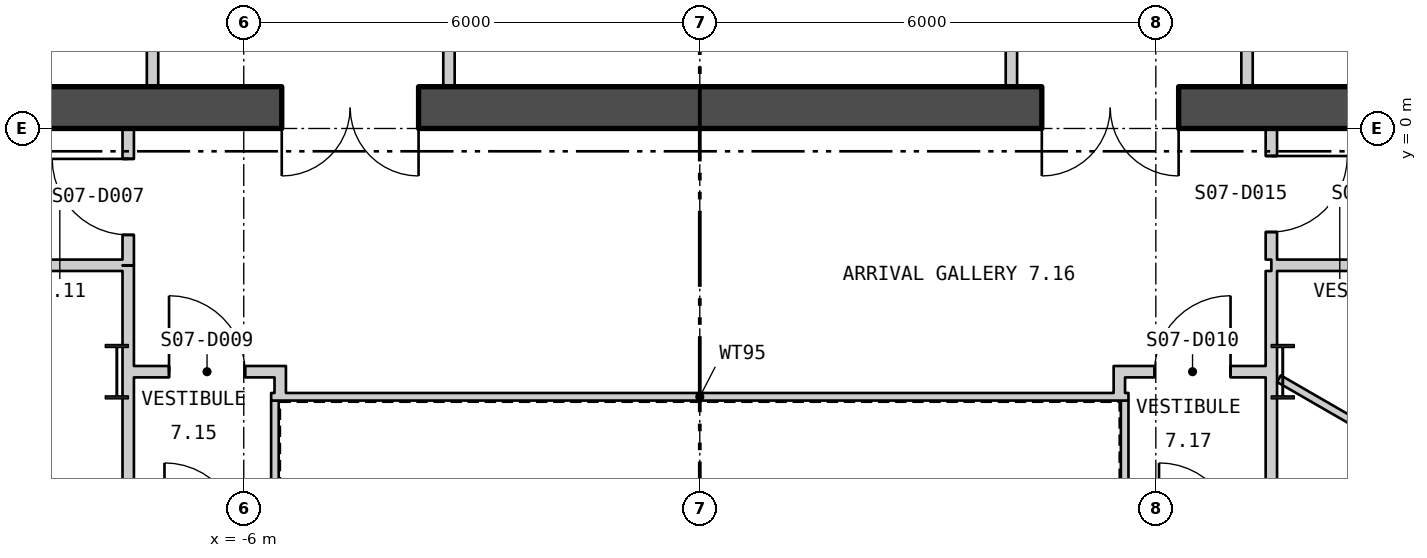
"""IFC4 building model, lengths in metres.
Left out: names, types, materials, properties, quantities, classifications, styles, units other than length and angle.
Written with IfcOpenShell. Run it as: python <this file> out.ifc"""

import sys

from ifc_helpers import new_model, si_unit, direction, frame, frame_2d, origin, origin_2d, place, context, subcontext, project, spatial, polyline, rectangle, i_section, outline, extrude, element, fill, save


model = new_model("IFC4")
c1 = context("Model", 3, precision=1e-05, world=origin(), true_north=direction((0.0, 1.0)))
c2 = subcontext(c1, "Body", "Model", "MODEL_VIEW")
j1 = project(units=[si_unit("LENGTHUNIT", "METRE"), si_unit("PLANEANGLEUNIT", "RADIAN")], contexts=[c1])
p1 = place(None, origin())
s1 = spatial("IfcSite", under=j1, at=p1, CompositionType="ELEMENT")
p2 = place(p1, origin())
s2 = spatial("IfcBuilding", under=s1, at=p2, CompositionType="ELEMENT")
p3 = place(p2, frame((0.0, 0.0, 97.8)))
s3 = spatial("IfcBuildingStorey", under=s2, at=p3, CompositionType="ELEMENT", Elevation=97.8)
for number, where, z_axis, x_axis in (
    (1, (7.67, -3.2, 0.0), (0.0, 0.0, 1.0), (1.0, 0.0, 0.0)),
    (2, (-7.67, -3.2, 0.0), (0.0, 0.0, 1.0), (1.0, 0.0, 0.0)),
):
    element("IfcColumn", number, at=place(p3, frame(where, z_axis=z_axis, x_axis=x_axis)), inside=s3, PredefinedType="COLUMN", context=c2, shape_type="SweptSolid", body=[
        extrude(i_section(OverallWidth=0.304, OverallDepth=0.716, WebThickness=0.021, FlangeThickness=0.04, at=origin_2d()), origin(), (0.0, 0.0, 1.0), 4.5),
    ])
p4 = place(p3, frame((-27.775, 11.479, -0.18), z_axis=(0.0, 0.0, 1.0), x_axis=(0.500000711659, -0.866024992908, 0.0)))
e3 = element("IfcWall", 3, at=p4, inside=s3, PredefinedType="SOLIDWALL", context=c2, shape_type="SweptSolid", body=[
    extrude(outline(polyline([(-0.13, -0.225), (45.87, -0.225), (45.61, 0.225), (0.13, 0.225), (-0.13, -0.225)])), origin(), (0.0, 0.0, 1.0), 4.28),
])
p5 = place(p4, frame((1.424, 0.0, 1.08)))
e4 = element("IfcOpeningElement", 4, at=p5, cuts=e3, PredefinedType="OPENING", context=c2, shape_type="SweptSolid", body=[
    extrude(rectangle(XDim=2.4, YDim=2.6, at=frame_2d((1.2, 1.3))), frame((0.0, 0.235, 0.0), z_axis=(0.0, -1.0, 0.0), x_axis=(1.0, 0.0, 0.0)), (0.0, 0.0, 1.0), 0.47),
])
p6 = place(p4, frame((5.893, 0.0, 1.08)))
e5 = element("IfcOpeningElement", 5, at=p6, cuts=e3, PredefinedType="OPENING", context=c2, shape_type="SweptSolid", body=[
    extrude(rectangle(XDim=2.4, YDim=2.6, at=frame_2d((1.2, 1.3))), frame((0.0, 0.235, 0.0), z_axis=(0.0, -1.0, 0.0), x_axis=(1.0, 0.0, 0.0)), (0.0, 0.0, 1.0), 0.47),
])
p7 = place(p4, frame((10.401, 0.0, 1.08)))
e6 = element("IfcOpeningElement", 6, at=p7, cuts=e3, PredefinedType="OPENING", context=c2, shape_type="SweptSolid", body=[
    extrude(rectangle(XDim=2.4, YDim=2.6, at=frame_2d((1.2, 1.3))), frame((0.0, 0.235, 0.0), z_axis=(0.0, -1.0, 0.0), x_axis=(1.0, 0.0, 0.0)), (0.0, 0.0, 1.0), 0.47),
])
p8 = place(p4, frame((14.909, 0.0, 1.08)))
e7 = element("IfcOpeningElement", 7, at=p8, cuts=e3, PredefinedType="OPENING", context=c2, shape_type="SweptSolid", body=[
    extrude(rectangle(XDim=2.4, YDim=2.6, at=frame_2d((1.2, 1.3))), frame((0.0, 0.235, 0.0), z_axis=(0.0, -1.0, 0.0), x_axis=(1.0, 0.0, 0.0)), (0.0, 0.0, 1.0), 0.47),
])
p9 = place(p4, frame((19.416, 0.0, 1.08)))
e8 = element("IfcOpeningElement", 8, at=p9, cuts=e3, PredefinedType="OPENING", context=c2, shape_type="SweptSolid", body=[
    extrude(rectangle(XDim=2.4, YDim=2.6, at=frame_2d((1.2, 1.3))), frame((0.0, 0.235, 0.0), z_axis=(0.0, -1.0, 0.0), x_axis=(1.0, 0.0, 0.0)), (0.0, 0.0, 1.0), 0.47),
])
p10 = place(p4, frame((23.924, 0.0, 1.08)))
e9 = element("IfcOpeningElement", 9, at=p10, cuts=e3, PredefinedType="OPENING", context=c2, shape_type="SweptSolid", body=[
    extrude(rectangle(XDim=2.4, YDim=2.6, at=frame_2d((1.2, 1.3))), frame((0.0, 0.235, 0.0), z_axis=(0.0, -1.0, 0.0), x_axis=(1.0, 0.0, 0.0)), (0.0, 0.0, 1.0), 0.47),
])
p11 = place(p4, frame((28.431, 0.0, 1.08)))
e10 = element("IfcOpeningElement", 10, at=p11, cuts=e3, PredefinedType="OPENING", context=c2, shape_type="SweptSolid", body=[
    extrude(rectangle(XDim=2.4, YDim=2.6, at=frame_2d((1.2, 1.3))), frame((0.0, 0.235, 0.0), z_axis=(0.0, -1.0, 0.0), x_axis=(1.0, 0.0, 0.0)), (0.0, 0.0, 1.0), 0.47),
])
p12 = place(p4, frame((32.939, 0.0, 1.08)))
e11 = element("IfcOpeningElement", 11, at=p12, cuts=e3, PredefinedType="OPENING", context=c2, shape_type="SweptSolid", body=[
    extrude(rectangle(XDim=2.4, YDim=2.6, at=frame_2d((1.2, 1.3))), frame((0.0, 0.235, 0.0), z_axis=(0.0, -1.0, 0.0), x_axis=(1.0, 0.0, 0.0)), (0.0, 0.0, 1.0), 0.47),
])
p13 = place(p4, frame((37.447, 0.0, 1.08)))
e12 = element("IfcOpeningElement", 12, at=p13, cuts=e3, PredefinedType="OPENING", context=c2, shape_type="SweptSolid", body=[
    extrude(rectangle(XDim=2.4, YDim=2.6, at=frame_2d((1.2, 1.3))), frame((0.0, 0.235, 0.0), z_axis=(0.0, -1.0, 0.0), x_axis=(1.0, 0.0, 0.0)), (0.0, 0.0, 1.0), 0.47),
])
p14 = place(p4, frame((41.916, 0.0, 1.08)))
e13 = element("IfcOpeningElement", 13, at=p14, cuts=e3, PredefinedType="OPENING", context=c2, shape_type="SweptSolid", body=[
    extrude(rectangle(XDim=2.4, YDim=2.6, at=frame_2d((1.2, 1.3))), frame((0.0, 0.235, 0.0), z_axis=(0.0, -1.0, 0.0), x_axis=(1.0, 0.0, 0.0)), (0.0, 0.0, 1.0), 0.47),
])
p15 = place(p3, frame((4.905, -28.133, -0.18), z_axis=(0.0, 0.0, 1.0), x_axis=(0.500000711659, 0.866024992908, 0.0)))
e14 = element("IfcWall", 14, at=p15, inside=s3, PredefinedType="SOLIDWALL", context=c2, shape_type="SweptSolid", body=[
    extrude(outline(polyline([(-0.13, -0.225), (45.87, -0.225), (45.61, 0.225), (0.13, 0.225), (-0.13, -0.225)])), origin(), (0.0, 0.0, 1.0), 4.28),
])
p16 = place(p15, frame((1.424, 0.0, 1.08)))
e15 = element("IfcOpeningElement", 15, at=p16, cuts=e14, PredefinedType="OPENING", context=c2, shape_type="SweptSolid", body=[
    extrude(rectangle(XDim=2.4, YDim=2.6, at=frame_2d((1.2, 1.3))), frame((0.0, 0.235, 0.0), z_axis=(0.0, -1.0, 0.0), x_axis=(1.0, 0.0, 0.0)), (0.0, 0.0, 1.0), 0.47),
])
p17 = place(p15, frame((5.893, 0.0, 1.08)))
e16 = element("IfcOpeningElement", 16, at=p17, cuts=e14, PredefinedType="OPENING", context=c2, shape_type="SweptSolid", body=[
    extrude(rectangle(XDim=2.4, YDim=2.6, at=frame_2d((1.2, 1.3))), frame((0.0, 0.235, 0.0), z_axis=(0.0, -1.0, 0.0), x_axis=(1.0, 0.0, 0.0)), (0.0, 0.0, 1.0), 0.47),
])
p18 = place(p15, frame((10.401, 0.0, 1.08)))
e17 = element("IfcOpeningElement", 17, at=p18, cuts=e14, PredefinedType="OPENING", context=c2, shape_type="SweptSolid", body=[
    extrude(rectangle(XDim=2.4, YDim=2.6, at=frame_2d((1.2, 1.3))), frame((0.0, 0.235, 0.0), z_axis=(0.0, -1.0, 0.0), x_axis=(1.0, 0.0, 0.0)), (0.0, 0.0, 1.0), 0.47),
])
p19 = place(p15, frame((14.909, 0.0, 1.08)))
e18 = element("IfcOpeningElement", 18, at=p19, cuts=e14, PredefinedType="OPENING", context=c2, shape_type="SweptSolid", body=[
    extrude(rectangle(XDim=2.4, YDim=2.6, at=frame_2d((1.2, 1.3))), frame((0.0, 0.235, 0.0), z_axis=(0.0, -1.0, 0.0), x_axis=(1.0, 0.0, 0.0)), (0.0, 0.0, 1.0), 0.47),
])
p20 = place(p15, frame((19.416, 0.0, 1.08)))
e19 = element("IfcOpeningElement", 19, at=p20, cuts=e14, PredefinedType="OPENING", context=c2, shape_type="SweptSolid", body=[
    extrude(rectangle(XDim=2.4, YDim=2.6, at=frame_2d((1.2, 1.3))), frame((0.0, 0.235, 0.0), z_axis=(0.0, -1.0, 0.0), x_axis=(1.0, 0.0, 0.0)), (0.0, 0.0, 1.0), 0.47),
])
p21 = place(p15, frame((28.431, 0.0, 1.08)))
e20 = element("IfcOpeningElement", 20, at=p21, cuts=e14, PredefinedType="OPENING", context=c2, shape_type="SweptSolid", body=[
    extrude(rectangle(XDim=2.4, YDim=2.6, at=frame_2d((1.2, 1.3))), frame((0.0, 0.235, 0.0), z_axis=(0.0, -1.0, 0.0), x_axis=(1.0, 0.0, 0.0)), (0.0, 0.0, 1.0), 0.47),
])
p22 = place(p15, frame((32.939, 0.0, 1.08)))
e21 = element("IfcOpeningElement", 21, at=p22, cuts=e14, PredefinedType="OPENING", context=c2, shape_type="SweptSolid", body=[
    extrude(rectangle(XDim=2.4, YDim=2.6, at=frame_2d((1.2, 1.3))), frame((0.0, 0.235, 0.0), z_axis=(0.0, -1.0, 0.0), x_axis=(1.0, 0.0, 0.0)), (0.0, 0.0, 1.0), 0.47),
])
p23 = place(p15, frame((37.447, 0.0, 1.08)))
e22 = element("IfcOpeningElement", 22, at=p23, cuts=e14, PredefinedType="OPENING", context=c2, shape_type="SweptSolid", body=[
    extrude(rectangle(XDim=2.4, YDim=2.6, at=frame_2d((1.2, 1.3))), frame((0.0, 0.235, 0.0), z_axis=(0.0, -1.0, 0.0), x_axis=(1.0, 0.0, 0.0)), (0.0, 0.0, 1.0), 0.47),
])
p24 = place(p15, frame((41.916, 0.0, 1.08)))
e23 = element("IfcOpeningElement", 23, at=p24, cuts=e14, PredefinedType="OPENING", context=c2, shape_type="SweptSolid", body=[
    extrude(rectangle(XDim=2.4, YDim=2.6, at=frame_2d((1.2, 1.3))), frame((0.0, 0.235, 0.0), z_axis=(0.0, -1.0, 0.0), x_axis=(1.0, 0.0, 0.0)), (0.0, 0.0, 1.0), 0.47),
])
p25 = place(p3, frame((5.59, -11.62, 0.0), z_axis=(0.0, 0.0, 1.0), x_axis=(0.0, 1.0, 0.0)))
e24 = element("IfcWall", 24, at=p25, inside=s3, PredefinedType="PARTITIONING", context=c2, shape_type="SweptSolid", body=[
    extrude(rectangle(XDim=8.04, YDim=0.1, at=frame_2d((4.02, 0.0))), origin(), (0.0, 0.0, 1.0), 4.3),
])
p26 = place(p3, frame((5.64, -3.53, 0.0), z_axis=(0.0, 0.0, 1.0), x_axis=(-1.0, 0.0, 0.0)))
e25 = element("IfcWall", 25, at=p26, inside=s3, PredefinedType="PARTITIONING", context=c2, shape_type="SweptSolid", body=[
    extrude(rectangle(XDim=11.28, YDim=0.1, at=frame_2d((5.64, 0.0))), origin(), (0.0, 0.0, 1.0), 4.3),
])
p27 = place(p3, frame((-5.59, -3.58, 0.0), z_axis=(0.0, 0.0, 1.0), x_axis=(0.0, -1.0, 0.0)))
e26 = element("IfcWall", 26, at=p27, inside=s3, PredefinedType="PARTITIONING", context=c2, shape_type="SweptSolid", body=[
    extrude(rectangle(XDim=8.04, YDim=0.1, at=frame_2d((4.02, 0.0))), origin(), (0.0, 0.0, 1.0), 4.3),
])
p28 = place(p3, frame((-17.5, 0.275, 0.0), z_axis=(0.0, 0.0, 1.0), x_axis=(1.0, 0.0, 0.0)))
e27 = element("IfcWall", 27, at=p28, inside=s3, PredefinedType="SHEAR", context=c2, shape_type="SweptSolid", body=[
    extrude(rectangle(XDim=35.0, YDim=0.55, at=frame_2d((17.5, 0.0))), origin(), (0.0, 0.0, 1.0), 4.3),
])
p29 = place(p28, frame((12.0, 0.0, 0.0)))
e28 = element("IfcOpeningElement", 28, at=p29, cuts=e27, PredefinedType="OPENING", context=c2, shape_type="SweptSolid", body=[
    extrude(rectangle(XDim=1.8, YDim=2.4, at=frame_2d((0.9, 1.2))), frame((0.0, 0.285, 0.0), z_axis=(0.0, -1.0, 0.0), x_axis=(1.0, 0.0, 0.0)), (0.0, 0.0, 1.0), 0.57),
])
p30 = place(p28, frame((22.0, 0.0, 0.0)))
e29 = element("IfcOpeningElement", 29, at=p30, cuts=e27, PredefinedType="OPENING", context=c2, shape_type="SweptSolid", body=[
    extrude(rectangle(XDim=1.8, YDim=2.4, at=frame_2d((0.9, 1.2))), frame((0.0, 0.285, 0.0), z_axis=(0.0, -1.0, 0.0), x_axis=(1.0, 0.0, 0.0)), (0.0, 0.0, 1.0), 0.57),
])
p31 = place(p3, frame((7.2, 0.55, 0.0), z_axis=(0.0, 0.0, 1.0), x_axis=(0.0, 1.0, 0.0)))
e30 = element("IfcWall", 30, at=p31, inside=s3, PredefinedType="PARTITIONING", context=c2, shape_type="SweptSolid", body=[
    extrude(rectangle(XDim=3.075, YDim=0.15, at=frame_2d((1.538, 0.0))), origin(), (0.0, 0.0, 1.0), 4.3),
])
for number, where, z_axis, x_axis in (
    (31, (-3.3, 0.55, 0.0), (0.0, 0.0, 1.0), (0.0, 1.0, 0.0)),
    (32, (4.1, 0.55, 0.0), (0.0, 0.0, 1.0), (0.0, 1.0, 0.0)),
):
    element("IfcWall", number, at=place(p3, frame(where, z_axis=z_axis, x_axis=x_axis)), inside=s3, PredefinedType="PARTITIONING", context=c2, shape_type="SweptSolid", body=[
        extrude(rectangle(XDim=3.275, YDim=0.15, at=frame_2d((1.637, 0.0))), origin(), (0.0, 0.0, 1.0), 4.3),
    ])
p32 = place(p3, frame((-7.2, 0.55, 0.0), z_axis=(0.0, 0.0, 1.0), x_axis=(0.0, 1.0, 0.0)))
e33 = element("IfcWall", 33, at=p32, inside=s3, PredefinedType="PARTITIONING", context=c2, shape_type="SweptSolid", body=[
    extrude(rectangle(XDim=3.075, YDim=0.15, at=frame_2d((1.538, 0.0))), origin(), (0.0, 0.0, 1.0), 4.3),
])
p33 = place(p3, frame((-19.225, -1.8, 0.0), z_axis=(0.0, 0.0, 1.0), x_axis=(1.0, 0.0, 0.0)))
e34 = element("IfcWall", 34, at=p33, inside=s3, PredefinedType="PARTITIONING", context=c2, shape_type="SweptSolid", body=[
    extrude(rectangle(XDim=11.63, YDim=0.15, at=frame_2d((5.815, 0.0))), origin(), (0.0, 0.0, 1.0), 4.3),
])
p34 = place(p3, frame((-7.52, -13.675, 0.0), z_axis=(0.0, 0.0, 1.0), x_axis=(0.0, 1.0, 0.0)))
e35 = element("IfcWall", 35, at=p34, inside=s3, PredefinedType="PARTITIONING", context=c2, shape_type="SweptSolid", body=[
    extrude(rectangle(XDim=10.167, YDim=0.15, at=frame_2d((5.083, 0.0))), origin(), (0.0, 0.0, 1.0), 3.7),
])
p35 = place(p34, frame((2.079, 0.0, 0.0)))
e36 = element("IfcOpeningElement", 36, at=p35, cuts=e35, PredefinedType="OPENING", context=c2, shape_type="SweptSolid", body=[
    extrude(rectangle(XDim=1.0, YDim=2.1, at=frame_2d((0.5, 1.05))), frame((0.0, 0.085, 0.0), z_axis=(0.0, -1.0, 0.0), x_axis=(1.0, 0.0, 0.0)), (0.0, 0.0, 1.0), 0.17),
])
p36 = place(p3, frame((-7.52, -3.508, 0.0), z_axis=(0.0, 0.0, 1.0), x_axis=(0.0, 1.0, 0.0)))
e37 = element("IfcWall", 37, at=p36, inside=s3, PredefinedType="PARTITIONING", context=c2, shape_type="SweptSolid", body=[
    extrude(rectangle(XDim=1.704, YDim=0.15, at=frame_2d((0.852, 0.0))), origin(), (0.0, 0.0, 1.0), 4.3),
])
p37 = place(p3, frame((-7.52, -1.8, 0.0), z_axis=(0.0, 0.0, 1.0), x_axis=(0.0, 1.0, 0.0)))
e38 = element("IfcWall", 38, at=p37, inside=s3, PredefinedType="PARTITIONING", context=c2, shape_type="SweptSolid", body=[
    extrude(rectangle(XDim=1.8, YDim=0.15, at=frame_2d((0.9, 0.0))), origin(), (0.0, 0.0, 1.0), 4.3),
])
p38 = place(p37, frame((0.4, 0.0, 0.0)))
e39 = element("IfcOpeningElement", 39, at=p38, cuts=e38, PredefinedType="OPENING", context=c2, shape_type="SweptSolid", body=[
    extrude(rectangle(XDim=1.0, YDim=2.1, at=frame_2d((0.5, 1.05))), frame((0.0, 0.085, 0.0), z_axis=(0.0, -1.0, 0.0), x_axis=(1.0, 0.0, 0.0)), (0.0, 0.0, 1.0), 0.17),
])
p39 = place(p3, frame((-7.445, -3.2, 0.0), z_axis=(0.0, 0.0, 1.0), x_axis=(1.0, 0.0, 0.0)))
e40 = element("IfcWall", 40, at=p39, inside=s3, PredefinedType="PARTITIONING", context=c2, shape_type="SweptSolid", body=[
    extrude(rectangle(XDim=2.0, YDim=0.15, at=frame_2d((1.0, 0.0))), origin(), (0.0, 0.0, 1.0), 3.39),
])
p40 = place(p39, frame((0.462, 0.0, 0.0)))
e41 = element("IfcOpeningElement", 41, at=p40, cuts=e40, PredefinedType="OPENING", context=c2, shape_type="SweptSolid", body=[
    extrude(rectangle(XDim=1.0, YDim=2.1, at=frame_2d((0.5, 1.05))), frame((0.0, 0.085, 0.0), z_axis=(0.0, -1.0, 0.0), x_axis=(1.0, 0.0, 0.0)), (0.0, 0.0, 1.0), 0.17),
])
p41 = place(p3, frame((-5.52, -3.48, 0.0), z_axis=(0.0, 0.0, 1.0), x_axis=(0.0, 1.0, 0.0)))
e42 = element("IfcWall", 42, at=p41, inside=s3, PredefinedType="PARTITIONING", context=c2, shape_type="SweptSolid", body=[
    extrude(rectangle(XDim=0.205, YDim=0.15, at=frame_2d((0.102, 0.0))), origin(), (0.0, 0.0, 1.0), 4.3),
])
p42 = place(p3, frame((5.445, -3.2, 0.0), z_axis=(0.0, 0.0, 1.0), x_axis=(1.0, 0.0, 0.0)))
e43 = element("IfcWall", 43, at=p42, inside=s3, PredefinedType="PARTITIONING", context=c2, shape_type="SweptSolid", body=[
    extrude(rectangle(XDim=2.0, YDim=0.15, at=frame_2d((1.0, 0.0))), origin(), (0.0, 0.0, 1.0), 3.39),
])
p43 = place(p42, frame((0.538, 0.0, 0.0)))
e44 = element("IfcOpeningElement", 44, at=p43, cuts=e43, PredefinedType="OPENING", context=c2, shape_type="SweptSolid", body=[
    extrude(rectangle(XDim=1.0, YDim=2.1, at=frame_2d((0.5, 1.05))), frame((0.0, 0.085, 0.0), z_axis=(0.0, -1.0, 0.0), x_axis=(1.0, 0.0, 0.0)), (0.0, 0.0, 1.0), 0.17),
])
p44 = place(p3, frame((5.52, -3.48, 0.0), z_axis=(0.0, 0.0, 1.0), x_axis=(0.0, 1.0, 0.0)))
e45 = element("IfcWall", 45, at=p44, inside=s3, PredefinedType="PARTITIONING", context=c2, shape_type="SweptSolid", body=[
    extrude(rectangle(XDim=0.205, YDim=0.15, at=frame_2d((0.102, 0.0))), origin(), (0.0, 0.0, 1.0), 4.3),
])
p45 = place(p3, frame((7.52, -13.675, 0.0), z_axis=(0.0, 0.0, 1.0), x_axis=(0.0, 1.0, 0.0)))
e46 = element("IfcWall", 46, at=p45, inside=s3, PredefinedType="PARTITIONING", context=c2, shape_type="SweptSolid", body=[
    extrude(rectangle(XDim=10.452, YDim=0.15, at=frame_2d((5.226, 0.0))), origin(), (0.0, 0.0, 1.0), 3.7),
])
p46 = place(p45, frame((5.435, 0.0, 0.0)))
e47 = element("IfcOpeningElement", 47, at=p46, cuts=e46, PredefinedType="OPENING", context=c2, shape_type="SweptSolid", body=[
    extrude(rectangle(XDim=1.0, YDim=2.1, at=frame_2d((0.5, 1.05))), frame((0.0, 0.085, 0.0), z_axis=(0.0, -1.0, 0.0), x_axis=(1.0, 0.0, 0.0)), (0.0, 0.0, 1.0), 0.17),
])
p47 = place(p3, frame((7.52, -3.223, 0.0), z_axis=(0.0, 0.0, 1.0), x_axis=(0.0, 1.0, 0.0)))
e48 = element("IfcWall", 48, at=p47, inside=s3, PredefinedType="PARTITIONING", context=c2, shape_type="SweptSolid", body=[
    extrude(rectangle(XDim=1.348, YDim=0.15, at=frame_2d((0.674, 0.0))), origin(), (0.0, 0.0, 1.0), 4.3),
])
p48 = place(p3, frame((7.52, -1.8, 0.0), z_axis=(0.0, 0.0, 1.0), x_axis=(1.0, 0.0, 0.0)))
e49 = element("IfcWall", 49, at=p48, inside=s3, PredefinedType="PARTITIONING", context=c2, shape_type="SweptSolid", body=[
    extrude(rectangle(XDim=11.705, YDim=0.15, at=frame_2d((5.853, 0.0))), origin(), (0.0, 0.0, 1.0), 4.3),
])
p49 = place(p48, frame((3.028, 0.0, 0.0)))
e50 = element("IfcOpeningElement", 50, at=p49, cuts=e49, PredefinedType="OPENING", context=c2, shape_type="SweptSolid", body=[
    extrude(rectangle(XDim=1.0, YDim=2.1, at=frame_2d((0.5, 1.05))), frame((0.0, 0.085, 0.0), z_axis=(0.0, -1.0, 0.0), x_axis=(1.0, 0.0, 0.0)), (0.0, 0.0, 1.0), 0.17),
])
p50 = place(p48, frame((6.7, 0.0, 0.0)))
e51 = element("IfcOpeningElement", 51, at=p50, cuts=e49, PredefinedType="OPENING", context=c2, shape_type="SweptSolid", body=[
    extrude(rectangle(XDim=1.0, YDim=2.1, at=frame_2d((0.5, 1.05))), frame((0.0, 0.085, 0.0), z_axis=(0.0, -1.0, 0.0), x_axis=(1.0, 0.0, 0.0)), (0.0, 0.0, 1.0), 0.17),
])
p51 = place(p3, frame((7.52, -1.725, 0.0), z_axis=(0.0, 0.0, 1.0), x_axis=(0.0, 1.0, 0.0)))
e52 = element("IfcWall", 52, at=p51, inside=s3, PredefinedType="PARTITIONING", context=c2, shape_type="SweptSolid", body=[
    extrude(rectangle(XDim=1.725, YDim=0.15, at=frame_2d((0.863, 0.0))), origin(), (0.0, 0.0, 1.0), 4.3),
])
p52 = place(p51, frame((0.363, 0.0, 0.0)))
e53 = element("IfcOpeningElement", 53, at=p52, cuts=e52, PredefinedType="OPENING", context=c2, shape_type="SweptSolid", body=[
    extrude(rectangle(XDim=1.0, YDim=2.1, at=frame_2d((0.5, 1.05))), frame((0.0, 0.085, 0.0), z_axis=(0.0, -1.0, 0.0), x_axis=(1.0, 0.0, 0.0)), (0.0, 0.0, 1.0), 0.17),
])
p53 = place(p3, frame((7.62, -3.292, 0.0), z_axis=(0.0, 0.0, 1.0), x_axis=(0.866086324858, -0.499894466757, 0.0)))
e54 = element("IfcWall", 54, at=p53, inside=s3, PredefinedType="PARTITIONING", context=c2, shape_type="SweptSolid", body=[
    extrude(rectangle(XDim=9.394, YDim=0.1, at=frame_2d((4.697, 0.0))), origin(), (0.0, 0.0, 1.0), 4.3),
])
p54 = place(p29, origin())
e55 = element("IfcDoor", 55, at=p54, inside=s3, OperationType="DOUBLE_DOOR_SINGLE_SWING", PredefinedType="DOOR", context=c2, shape_type="SweptSolid", body=[
    extrude(rectangle(XDim=1.8, YDim=2.4, at=frame_2d((0.9, 1.2))), frame((0.0, 0.025, 0.0), z_axis=(0.0, -1.0, 0.0), x_axis=(1.0, 0.0, 0.0)), (0.0, 0.0, 1.0), 0.05),
])
fill(e28, e55)
p55 = place(p30, origin())
e56 = element("IfcDoor", 56, at=p55, inside=s3, OperationType="DOUBLE_DOOR_SINGLE_SWING", PredefinedType="DOOR", context=c2, shape_type="SweptSolid", body=[
    extrude(rectangle(XDim=1.8, YDim=2.4, at=frame_2d((0.9, 1.2))), frame((0.0, 0.025, 0.0), z_axis=(0.0, -1.0, 0.0), x_axis=(1.0, 0.0, 0.0)), (0.0, 0.0, 1.0), 0.05),
])
fill(e29, e56)
p56 = place(p38, origin())
e57 = element("IfcDoor", 57, at=p56, inside=s3, OperationType="SINGLE_SWING_LEFT", PredefinedType="DOOR", context=c2, shape_type="SweptSolid", body=[
    extrude(rectangle(XDim=1.0, YDim=2.1, at=frame_2d((0.5, 1.05))), frame((0.0, 0.025, 0.0), z_axis=(0.0, -1.0, 0.0), x_axis=(1.0, 0.0, 0.0)), (0.0, 0.0, 1.0), 0.05),
])
fill(e39, e57)
p57 = place(p40, origin())
e58 = element("IfcDoor", 58, at=p57, inside=s3, OperationType="SINGLE_SWING_RIGHT", PredefinedType="DOOR", context=c2, shape_type="SweptSolid", body=[
    extrude(rectangle(XDim=1.0, YDim=2.1, at=frame_2d((0.5, 1.05))), frame((0.0, 0.025, 0.0), z_axis=(0.0, -1.0, 0.0), x_axis=(1.0, 0.0, 0.0)), (0.0, 0.0, 1.0), 0.05),
])
fill(e41, e58)
p58 = place(p43, origin())
e59 = element("IfcDoor", 59, at=p58, inside=s3, OperationType="SINGLE_SWING_LEFT", PredefinedType="DOOR", context=c2, shape_type="SweptSolid", body=[
    extrude(rectangle(XDim=1.0, YDim=2.1, at=frame_2d((0.5, 1.05))), frame((0.0, 0.025, 0.0), z_axis=(0.0, -1.0, 0.0), x_axis=(1.0, 0.0, 0.0)), (0.0, 0.0, 1.0), 0.05),
])
fill(e44, e59)
p59 = place(p52, origin())
e60 = element("IfcDoor", 60, at=p59, inside=s3, OperationType="SINGLE_SWING_RIGHT", PredefinedType="DOOR", context=c2, shape_type="SweptSolid", body=[
    extrude(rectangle(XDim=1.0, YDim=2.1, at=frame_2d((0.5, 1.05))), frame((0.0, 0.025, 0.0), z_axis=(0.0, -1.0, 0.0), x_axis=(1.0, 0.0, 0.0)), (0.0, 0.0, 1.0), 0.05),
])
fill(e53, e60)
save(model, sys.argv[1])
